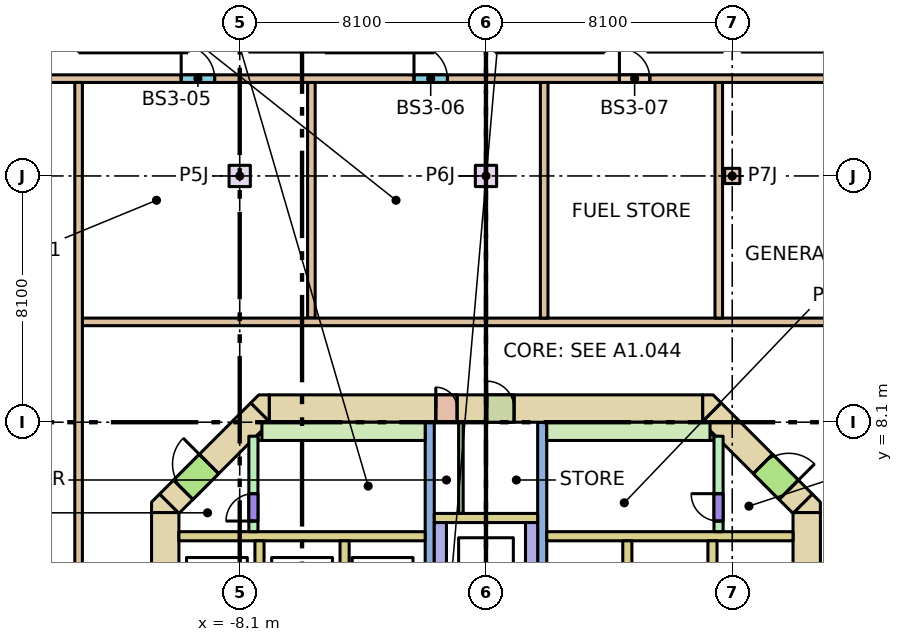
"""IFC4 building model, lengths in metres.
Left out: names, types, materials, properties, quantities, classifications, styles, units other than length and angle.
Written with IfcOpenShell. Run it as: python <this file> out.ifc"""

import sys

from ifc_helpers import new_model, si_unit, direction, frame, frame_2d, origin, origin_2d, place, context, subcontext, project, spatial, polyline, rectangle, outline, extrude, element, fill, save


model = new_model("IFC4")
c1 = context("Model", 3, precision=1e-05, world=origin(), true_north=direction((0.0, 1.0)))
c2 = subcontext(c1, "Body", "Model", "MODEL_VIEW")
j1 = project(units=[si_unit("LENGTHUNIT", "METRE"), si_unit("PLANEANGLEUNIT", "RADIAN")], contexts=[c1])
p1 = place(None, origin())
s1 = spatial("IfcSite", under=j1, at=p1, CompositionType="ELEMENT")
p2 = place(p1, origin())
s2 = spatial("IfcBuilding", under=s1, at=p2, CompositionType="ELEMENT")
p3 = place(p2, frame((0.0, 0.0, -10.8)))
s3 = spatial("IfcBuildingStorey", under=s2, at=p3, CompositionType="ELEMENT", Elevation=-10.8)
for number, where, z_axis, x_axis in (
    (1, (-8.1, 16.2, 0.0), (0.0, 0.0, 1.0), (1.0, 0.0, 0.0)),
    (2, (0.0, 16.2, 0.0), (0.0, 0.0, 1.0), (1.0, 0.0, 0.0)),
):
    element("IfcColumn", number, at=place(p3, frame(where, z_axis=z_axis, x_axis=x_axis)), inside=s3, PredefinedType="COLUMN", context=c2, shape_type="SweptSolid", body=[
        extrude(rectangle(XDim=0.7, YDim=0.7, at=origin_2d()), origin(), (0.0, 0.0, 1.0), 3.6),
    ])
p4 = place(p3, frame((8.1, 16.2, 0.0), z_axis=(0.0, 0.0, 1.0), x_axis=(1.0, 0.0, 0.0)))
e3 = element("IfcColumn", 3, at=p4, inside=s3, PredefinedType="COLUMN", context=c2, shape_type="SweptSolid", body=[
    extrude(rectangle(XDim=0.5, YDim=0.5, at=origin_2d()), origin(), (0.0, 0.0, 1.0), 3.6),
])
p5 = place(p3, frame((-7.13, 8.55, 0.0), z_axis=(0.0, 0.0, 1.0), x_axis=(1.0, 0.0, 0.0)))
e4 = element("IfcWall", 4, at=p5, inside=s3, PredefinedType="SHEAR", context=c2, shape_type="SweptSolid", body=[
    extrude(rectangle(XDim=14.26, YDim=0.9, at=frame_2d((7.13, 0.0))), origin(), (0.0, 0.0, 1.0), 3.28),
])
p6 = place(p5, frame((5.48, 0.0, 0.0)))
e5 = element("IfcOpeningElement", 5, at=p6, cuts=e4, PredefinedType="OPENING", context=c2, shape_type="SweptSolid", body=[
    extrude(rectangle(XDim=0.7, YDim=2.1, at=frame_2d((0.35, 1.05))), frame((0.0, 0.46, 0.0), z_axis=(0.0, -1.0, 0.0), x_axis=(1.0, 0.0, 0.0)), (0.0, 0.0, 1.0), 0.92),
])
p7 = place(p5, frame((7.155, 0.0, 0.0)))
e6 = element("IfcOpeningElement", 6, at=p7, cuts=e4, PredefinedType="OPENING", context=c2, shape_type="SweptSolid", body=[
    extrude(rectangle(XDim=0.9, YDim=2.1, at=frame_2d((0.45, 1.05))), frame((0.0, 0.46, 0.0), z_axis=(0.0, -1.0, 0.0), x_axis=(1.0, 0.0, 0.0)), (0.0, 0.0, 1.0), 0.92),
])
p8 = place(p3, frame((-10.55, -5.13, 0.0), z_axis=(0.0, 0.0, 1.0), x_axis=(0.0, 1.0, 0.0)))
e7 = element("IfcWall", 7, at=p8, inside=s3, PredefinedType="SHEAR", context=c2, shape_type="SweptSolid", body=[
    extrude(rectangle(XDim=10.26, YDim=0.9, at=frame_2d((5.13, 0.0))), origin(), (0.0, 0.0, 1.0), 3.28),
])
p9 = place(p8, frame((4.13, 0.0, 0.0)))
e8 = element("IfcOpeningElement", 8, at=p9, cuts=e7, PredefinedType="OPENING", context=c2, shape_type="SweptSolid", body=[
    extrude(rectangle(XDim=2.0, YDim=2.1, at=frame_2d((1.0, 1.05))), frame((0.0, 0.46, 0.0), z_axis=(0.0, -1.0, 0.0), x_axis=(1.0, 0.0, 0.0)), (0.0, 0.0, 1.0), 0.92),
])
p10 = place(p3, frame((10.55, -5.13, 0.0), z_axis=(0.0, 0.0, 1.0), x_axis=(0.0, 1.0, 0.0)))
e9 = element("IfcWall", 9, at=p10, inside=s3, PredefinedType="SHEAR", context=c2, shape_type="SweptSolid", body=[
    extrude(rectangle(XDim=10.26, YDim=0.9, at=frame_2d((5.13, 0.0))), origin(), (0.0, 0.0, 1.0), 3.28),
])
p11 = place(p10, frame((4.13, 0.0, 0.0)))
e10 = element("IfcOpeningElement", 10, at=p11, cuts=e9, PredefinedType="OPENING", context=c2, shape_type="SweptSolid", body=[
    extrude(rectangle(XDim=2.0, YDim=2.1, at=frame_2d((1.0, 1.05))), frame((0.0, 0.46, 0.0), z_axis=(0.0, -1.0, 0.0), x_axis=(1.0, 0.0, 0.0)), (0.0, 0.0, 1.0), 0.92),
])
p12 = place(p3, frame((-10.418, 5.418, 0.0), z_axis=(0.0, 0.0, 1.0), x_axis=(0.707106781187, 0.707106781187, 0.0)))
e11 = element("IfcWall", 11, at=p12, inside=s3, PredefinedType="SHEAR", context=c2, shape_type="SweptSolid", body=[
    extrude(rectangle(XDim=4.243, YDim=0.9, at=frame_2d((2.121, 0.0))), origin(), (0.0, 0.0, 1.0), 3.28),
])
p13 = place(p12, frame((0.65, 0.0, 0.0)))
e12 = element("IfcOpeningElement", 12, at=p13, cuts=e11, PredefinedType="OPENING", context=c2, shape_type="SweptSolid", body=[
    extrude(rectangle(XDim=1.2, YDim=2.1, at=frame_2d((0.6, 1.05))), frame((0.0, 0.46, 0.0), z_axis=(0.0, -1.0, 0.0), x_axis=(1.0, 0.0, 0.0)), (0.0, 0.0, 1.0), 0.92),
])
p14 = place(p3, frame((7.418, 8.418, 0.0), z_axis=(0.0, 0.0, 1.0), x_axis=(0.707106781187, -0.707106781187, 0.0)))
e13 = element("IfcWall", 13, at=p14, inside=s3, PredefinedType="SHEAR", context=c2, shape_type="SweptSolid", body=[
    extrude(rectangle(XDim=4.243, YDim=0.9, at=frame_2d((2.121, 0.0))), origin(), (0.0, 0.0, 1.0), 3.28),
])
p15 = place(p14, frame((2.393, 0.0, 0.0)))
e14 = element("IfcOpeningElement", 14, at=p15, cuts=e13, PredefinedType="OPENING", context=c2, shape_type="SweptSolid", body=[
    extrude(rectangle(XDim=1.2, YDim=2.1, at=frame_2d((0.6, 1.05))), frame((0.0, 0.46, 0.0), z_axis=(0.0, -1.0, 0.0), x_axis=(1.0, 0.0, 0.0)), (0.0, 0.0, 1.0), 0.92),
])
p16 = place(p3, origin())
e15 = element("IfcWall", 15, at=p16, inside=s3, PredefinedType="SHEAR", context=c2, shape_type="SweptSolid", body=[
    extrude(outline(polyline([(-10.736, 5.736), (-10.13, 5.13), (-11.0, 5.13), (-11.0, 5.473), (-10.736, 5.736)])), origin(), (0.0, 0.0, 1.0), 3.28),
])
p17 = place(p3, origin())
e16 = element("IfcWall", 16, at=p17, inside=s3, PredefinedType="SHEAR", context=c2, shape_type="SweptSolid", body=[
    extrude(outline(polyline([(11.0, 5.473), (11.0, 5.13), (10.13, 5.13), (10.736, 5.736), (11.0, 5.473)])), origin(), (0.0, 0.0, 1.0), 3.28),
])
p18 = place(p3, origin())
e17 = element("IfcWall", 17, at=p18, inside=s3, PredefinedType="SHEAR", context=c2, shape_type="SweptSolid", body=[
    extrude(outline(polyline([(-7.473, 9.0), (-7.13, 9.0), (-7.13, 8.13), (-7.736, 8.736), (-7.473, 9.0)])), origin(), (0.0, 0.0, 1.0), 3.28),
])
p19 = place(p3, origin())
e18 = element("IfcWall", 18, at=p19, inside=s3, PredefinedType="SHEAR", context=c2, shape_type="SweptSolid", body=[
    extrude(outline(polyline([(7.473, 9.0), (7.736, 8.736), (7.13, 8.13), (7.13, 9.0), (7.473, 9.0)])), origin(), (0.0, 0.0, 1.0), 3.28),
])
for number, where, z_axis, x_axis in (
    (19, (-10.1, 4.35, 0.0), (0.0, 0.0, 1.0), (1.0, 0.0, 0.0)),
    (20, (2.0, 4.35, 0.0), (0.0, 0.0, 1.0), (1.0, 0.0, 0.0)),
):
    element("IfcWall", number, at=place(p3, frame(where, z_axis=z_axis, x_axis=x_axis)), inside=s3, PredefinedType="SOLIDWALL", context=c2, shape_type="SweptSolid", body=[
        extrude(rectangle(XDim=8.1, YDim=0.3, at=frame_2d((4.05, 0.0))), origin(), (0.0, 0.0, 1.0), 3.28),
    ])
for number, where, z_axis, x_axis in (
    (21, (-7.45, 1.8, 0.0), (0.0, 0.0, 1.0), (0.0, 1.0, 0.0)),
    (22, (-4.65, 1.8, 0.0), (0.0, 0.0, 1.0), (0.0, 1.0, 0.0)),
    (23, (4.65, 1.8, 0.0), (0.0, 0.0, 1.0), (0.0, 1.0, 0.0)),
    (24, (7.45, 1.8, 0.0), (0.0, 0.0, 1.0), (0.0, 1.0, 0.0)),
):
    element("IfcWall", number, at=place(p3, frame(where, z_axis=z_axis, x_axis=x_axis)), inside=s3, PredefinedType="SOLIDWALL", context=c2, shape_type="SweptSolid", body=[
        extrude(rectangle(XDim=2.4, YDim=0.3, at=frame_2d((1.2, 0.0))), origin(), (0.0, 0.0, 1.0), 3.28),
    ])
for number, where, z_axis, x_axis in (
    (25, (-1.85, 1.5, 0.0), (0.0, 0.0, 1.0), (0.0, 1.0, 0.0)),
    (26, (1.85, 1.5, 0.0), (0.0, 0.0, 1.0), (0.0, 1.0, 0.0)),
):
    element("IfcWall", number, at=place(p3, frame(where, z_axis=z_axis, x_axis=x_axis)), inside=s3, PredefinedType="SHEAR", context=c2, shape_type="SweptSolid", body=[
        extrude(rectangle(XDim=6.6, YDim=0.3, at=frame_2d((3.3, 0.0))), origin(), (0.0, 0.0, 1.0), 3.28),
    ])
for number, where, z_axis, x_axis in (
    (27, (-1.5, 1.8, 0.0), (0.0, 0.0, 1.0), (0.0, 1.0, 0.0)),
    (28, (1.5, 1.8, 0.0), (0.0, 0.0, 1.0), (0.0, 1.0, 0.0)),
):
    element("IfcWall", number, at=place(p3, frame(where, z_axis=z_axis, x_axis=x_axis)), inside=s3, PredefinedType="SOLIDWALL", context=c2, shape_type="SweptSolid", body=[
        extrude(rectangle(XDim=3.0, YDim=0.4, at=frame_2d((1.5, 0.0))), origin(), (0.0, 0.0, 1.0), 3.28),
    ])
p20 = place(p3, frame((-1.7, 4.95, 0.0), z_axis=(0.0, 0.0, 1.0), x_axis=(1.0, 0.0, 0.0)))
e29 = element("IfcWall", 29, at=p20, inside=s3, PredefinedType="SOLIDWALL", context=c2, shape_type="SweptSolid", body=[
    extrude(rectangle(XDim=3.4, YDim=0.3, at=frame_2d((1.7, 0.0))), origin(), (0.0, 0.0, 1.0), 3.28),
])
p21 = place(p3, frame((-7.65, 4.5, 0.0), z_axis=(0.0, 0.0, 1.0), x_axis=(0.0, 1.0, 0.0)))
e30 = element("IfcWall", 30, at=p21, inside=s3, PredefinedType="SHEAR", context=c2, shape_type="SweptSolid", body=[
    extrude(rectangle(XDim=3.14, YDim=0.3, at=frame_2d((1.57, 0.0))), origin(), (0.0, 0.0, 1.0), 3.28),
])
p22 = place(p21, frame((0.35, 0.0, 0.0)))
e31 = element("IfcOpeningElement", 31, at=p22, cuts=e30, PredefinedType="OPENING", context=c2, shape_type="SweptSolid", body=[
    extrude(rectangle(XDim=0.9, YDim=2.1, at=frame_2d((0.45, 1.05))), frame((0.0, 0.16, 0.0), z_axis=(0.0, -1.0, 0.0), x_axis=(1.0, 0.0, 0.0)), (0.0, 0.0, 1.0), 0.32),
])
p23 = place(p3, frame((-7.37, 7.8, 0.0), z_axis=(0.0, 0.0, 1.0), x_axis=(1.0, 0.0, 0.0)))
e32 = element("IfcWall", 32, at=p23, inside=s3, PredefinedType="SHEAR", context=c2, shape_type="SweptSolid", body=[
    extrude(rectangle(XDim=5.37, YDim=0.6, at=frame_2d((2.685, 0.0))), origin(), (0.0, 0.0, 1.0), 3.28),
])
p24 = place(p3, frame((7.65, 4.5, 0.0), z_axis=(0.0, 0.0, 1.0), x_axis=(0.0, 1.0, 0.0)))
e33 = element("IfcWall", 33, at=p24, inside=s3, PredefinedType="SHEAR", context=c2, shape_type="SweptSolid", body=[
    extrude(rectangle(XDim=3.14, YDim=0.3, at=frame_2d((1.57, 0.0))), origin(), (0.0, 0.0, 1.0), 3.28),
])
p25 = place(p24, frame((0.35, 0.0, 0.0)))
e34 = element("IfcOpeningElement", 34, at=p25, cuts=e33, PredefinedType="OPENING", context=c2, shape_type="SweptSolid", body=[
    extrude(rectangle(XDim=0.9, YDim=2.1, at=frame_2d((0.45, 1.05))), frame((0.0, 0.16, 0.0), z_axis=(0.0, -1.0, 0.0), x_axis=(1.0, 0.0, 0.0)), (0.0, 0.0, 1.0), 0.32),
])
p26 = place(p3, frame((2.0, 7.8, 0.0), z_axis=(0.0, 0.0, 1.0), x_axis=(1.0, 0.0, 0.0)))
e35 = element("IfcWall", 35, at=p26, inside=s3, PredefinedType="SHEAR", context=c2, shape_type="SweptSolid", body=[
    extrude(rectangle(XDim=5.37, YDim=0.6, at=frame_2d((2.685, 0.0))), origin(), (0.0, 0.0, 1.0), 3.28),
])
for number, where, z_axis, x_axis in (
    (36, (-7.5, 7.6, 0.0), (0.0, 0.0, 1.0), (1.0, 0.0, 0.0)),
    (37, (6.9, 7.6, 0.0), (0.0, 0.0, 1.0), (1.0, 0.0, 0.0)),
):
    element("IfcWall", number, at=place(p3, frame(where, z_axis=z_axis, x_axis=x_axis)), inside=s3, PredefinedType="SHEAR", context=c2, shape_type="SweptSolid", body=[
        extrude(rectangle(XDim=0.6, YDim=0.2, at=frame_2d((0.3, 0.0))), origin(), (0.0, 0.0, 1.0), 3.28),
    ])
p27 = place(p3, frame((-0.825, 5.1, 0.0), z_axis=(0.0, 0.0, 1.0), x_axis=(0.0, 1.0, 0.0)))
e38 = element("IfcWall", 38, at=p27, inside=s3, PredefinedType="PARTITIONING", context=c2, shape_type="SweptSolid", body=[
    extrude(rectangle(XDim=3.0, YDim=0.15, at=frame_2d((1.5, 0.0))), origin(), (0.0, 0.0, 1.0), 3.28),
])
p28 = place(p3, frame((-5.743, 11.525, 0.0), z_axis=(0.0, 0.0, 1.0), x_axis=(0.0, 1.0, 0.0)))
e39 = element("IfcWall", 39, at=p28, inside=s3, PredefinedType="PARTITIONING", context=c2, shape_type="SweptSolid", body=[
    extrude(rectangle(XDim=7.75, YDim=0.25, at=frame_2d((3.875, 0.0))), origin(), (0.0, 0.0, 1.0), 3.28),
])
p29 = place(p3, frame((-13.275, 11.4, 0.0), z_axis=(0.0, 0.0, 1.0), x_axis=(1.0, 0.0, 0.0)))
e40 = element("IfcWall", 40, at=p29, inside=s3, PredefinedType="PARTITIONING", context=c2, shape_type="SweptSolid", body=[
    extrude(rectangle(XDim=34.55, YDim=0.25, at=frame_2d((17.275, 0.0))), origin(), (0.0, 0.0, 1.0), 3.28),
])
for number, where, z_axis, x_axis in (
    (41, (1.914, 11.525, 0.0), (0.0, 0.0, 1.0), (0.0, 1.0, 0.0)),
    (42, (7.657, 11.525, 0.0), (0.0, 0.0, 1.0), (0.0, 1.0, 0.0)),
):
    element("IfcWall", number, at=place(p3, frame(where, z_axis=z_axis, x_axis=x_axis)), inside=s3, PredefinedType="PARTITIONING", context=c2, shape_type="SweptSolid", body=[
        extrude(rectangle(XDim=7.75, YDim=0.25, at=frame_2d((3.875, 0.0))), origin(), (0.0, 0.0, 1.0), 3.28),
    ])
p30 = place(p3, frame((-17.778, 19.4, 0.0), z_axis=(0.0, 0.0, 1.0), x_axis=(1.0, 0.0, 0.0)))
e43 = element("IfcWall", 43, at=p30, inside=s3, PredefinedType="PARTITIONING", context=c2, shape_type="SweptSolid", body=[
    extrude(rectangle(XDim=35.557, YDim=0.25, at=frame_2d((17.778, 0.0))), origin(), (0.0, 0.0, 1.0), 3.28),
])
p31 = place(p30, frame((7.753, 0.0, 0.0)))
e44 = element("IfcOpeningElement", 44, at=p31, cuts=e43, PredefinedType="OPENING", context=c2, shape_type="SweptSolid", body=[
    extrude(rectangle(XDim=1.1, YDim=2.1, at=frame_2d((0.55, 1.05))), frame((0.0, 0.135, 0.0), z_axis=(0.0, -1.0, 0.0), x_axis=(1.0, 0.0, 0.0)), (0.0, 0.0, 1.0), 0.27),
])
p32 = place(p30, frame((15.41, 0.0, 0.0)))
e45 = element("IfcOpeningElement", 45, at=p32, cuts=e43, PredefinedType="OPENING", context=c2, shape_type="SweptSolid", body=[
    extrude(rectangle(XDim=1.1, YDim=2.1, at=frame_2d((0.55, 1.05))), frame((0.0, 0.135, 0.0), z_axis=(0.0, -1.0, 0.0), x_axis=(1.0, 0.0, 0.0)), (0.0, 0.0, 1.0), 0.27),
])
p33 = place(p30, frame((22.167, 0.0, 0.0)))
e46 = element("IfcOpeningElement", 46, at=p33, cuts=e43, PredefinedType="OPENING", context=c2, shape_type="SweptSolid", body=[
    extrude(rectangle(XDim=1.0, YDim=2.1, at=frame_2d((0.5, 1.05))), frame((0.0, 0.135, 0.0), z_axis=(0.0, -1.0, 0.0), x_axis=(1.0, 0.0, 0.0)), (0.0, 0.0, 1.0), 0.27),
])
p34 = place(p30, frame((30.01, 0.0, 0.0)))
e47 = element("IfcOpeningElement", 47, at=p34, cuts=e43, PredefinedType="OPENING", context=c2, shape_type="SweptSolid", body=[
    extrude(rectangle(XDim=1.1, YDim=2.1, at=frame_2d((0.55, 1.05))), frame((0.0, 0.135, 0.0), z_axis=(0.0, -1.0, 0.0), x_axis=(1.0, 0.0, 0.0)), (0.0, 0.0, 1.0), 0.27),
])
p35 = place(p3, frame((-13.4, 1.725, 0.0), z_axis=(0.0, 0.0, 1.0), x_axis=(0.0, 1.0, 0.0)))
e48 = element("IfcWall", 48, at=p35, inside=s3, PredefinedType="PARTITIONING", context=c2, shape_type="SweptSolid", body=[
    extrude(rectangle(XDim=17.55, YDim=0.25, at=frame_2d((8.775, 0.0))), origin(), (0.0, 0.0, 1.0), 3.28),
])
p36 = place(p22, origin())
e49 = element("IfcDoor", 49, at=p36, inside=s3, OperationType="SINGLE_SWING_LEFT", PredefinedType="DOOR", context=c2, shape_type="SweptSolid", body=[
    extrude(rectangle(XDim=0.9, YDim=2.1, at=frame_2d((0.45, 1.05))), frame((0.0, 0.025, 0.0), z_axis=(0.0, -1.0, 0.0), x_axis=(1.0, 0.0, 0.0)), (0.0, 0.0, 1.0), 0.05),
])
fill(e31, e49)
p37 = place(p13, origin())
e50 = element("IfcDoor", 50, at=p37, inside=s3, OperationType="SINGLE_SWING_RIGHT", PredefinedType="DOOR", context=c2, shape_type="SweptSolid", body=[
    extrude(rectangle(XDim=1.2, YDim=2.1, at=frame_2d((0.6, 1.05))), frame((0.0, 0.025, 0.0), z_axis=(0.0, -1.0, 0.0), x_axis=(1.0, 0.0, 0.0)), (0.0, 0.0, 1.0), 0.05),
])
fill(e12, e50)
p38 = place(p25, origin())
e51 = element("IfcDoor", 51, at=p38, inside=s3, OperationType="SINGLE_SWING_RIGHT", PredefinedType="DOOR", context=c2, shape_type="SweptSolid", body=[
    extrude(rectangle(XDim=0.9, YDim=2.1, at=frame_2d((0.45, 1.05))), frame((0.0, 0.025, 0.0), z_axis=(0.0, -1.0, 0.0), x_axis=(1.0, 0.0, 0.0)), (0.0, 0.0, 1.0), 0.05),
])
fill(e34, e51)
p39 = place(p15, origin())
e52 = element("IfcDoor", 52, at=p39, inside=s3, OperationType="SINGLE_SWING_RIGHT", PredefinedType="DOOR", context=c2, shape_type="SweptSolid", body=[
    extrude(rectangle(XDim=1.2, YDim=2.1, at=frame_2d((0.6, 1.05))), frame((0.0, 0.025, 0.0), z_axis=(0.0, -1.0, 0.0), x_axis=(1.0, 0.0, 0.0)), (0.0, 0.0, 1.0), 0.05),
])
fill(e14, e52)
p40 = place(p6, origin())
e53 = element("IfcDoor", 53, at=p40, inside=s3, OperationType="SINGLE_SWING_LEFT", PredefinedType="DOOR", context=c2, shape_type="SweptSolid", body=[
    extrude(rectangle(XDim=0.7, YDim=2.1, at=frame_2d((0.35, 1.05))), frame((0.0, 0.025, 0.0), z_axis=(0.0, -1.0, 0.0), x_axis=(1.0, 0.0, 0.0)), (0.0, 0.0, 1.0), 0.05),
])
fill(e5, e53)
p41 = place(p7, origin())
e54 = element("IfcDoor", 54, at=p41, inside=s3, OperationType="SINGLE_SWING_LEFT", PredefinedType="DOOR", context=c2, shape_type="SweptSolid", body=[
    extrude(rectangle(XDim=0.9, YDim=2.1, at=frame_2d((0.45, 1.05))), frame((0.0, 0.025, 0.0), z_axis=(0.0, -1.0, 0.0), x_axis=(1.0, 0.0, 0.0)), (0.0, 0.0, 1.0), 0.05),
])
fill(e6, e54)
p42 = place(p31, origin())
e55 = element("IfcDoor", 55, at=p42, inside=s3, OperationType="SINGLE_SWING_LEFT", PredefinedType="DOOR", context=c2, shape_type="SweptSolid", body=[
    extrude(rectangle(XDim=1.1, YDim=2.1, at=frame_2d((0.55, 1.05))), frame((0.0, 0.025, 0.0), z_axis=(0.0, -1.0, 0.0), x_axis=(1.0, 0.0, 0.0)), (0.0, 0.0, 1.0), 0.05),
])
fill(e44, e55)
p43 = place(p32, origin())
e56 = element("IfcDoor", 56, at=p43, inside=s3, OperationType="SINGLE_SWING_LEFT", PredefinedType="DOOR", context=c2, shape_type="SweptSolid", body=[
    extrude(rectangle(XDim=1.1, YDim=2.1, at=frame_2d((0.55, 1.05))), frame((0.0, 0.025, 0.0), z_axis=(0.0, -1.0, 0.0), x_axis=(1.0, 0.0, 0.0)), (0.0, 0.0, 1.0), 0.05),
])
fill(e45, e56)
p44 = place(p33, origin())
e57 = element("IfcDoor", 57, at=p44, inside=s3, OperationType="SINGLE_SWING_LEFT", PredefinedType="DOOR", context=c2, shape_type="SweptSolid", body=[
    extrude(rectangle(XDim=1.0, YDim=2.1, at=frame_2d((0.5, 1.05))), frame((0.0, 0.025, 0.0), z_axis=(0.0, -1.0, 0.0), x_axis=(1.0, 0.0, 0.0)), (0.0, 0.0, 1.0), 0.05),
])
fill(e46, e57)
save(model, sys.argv[1])
